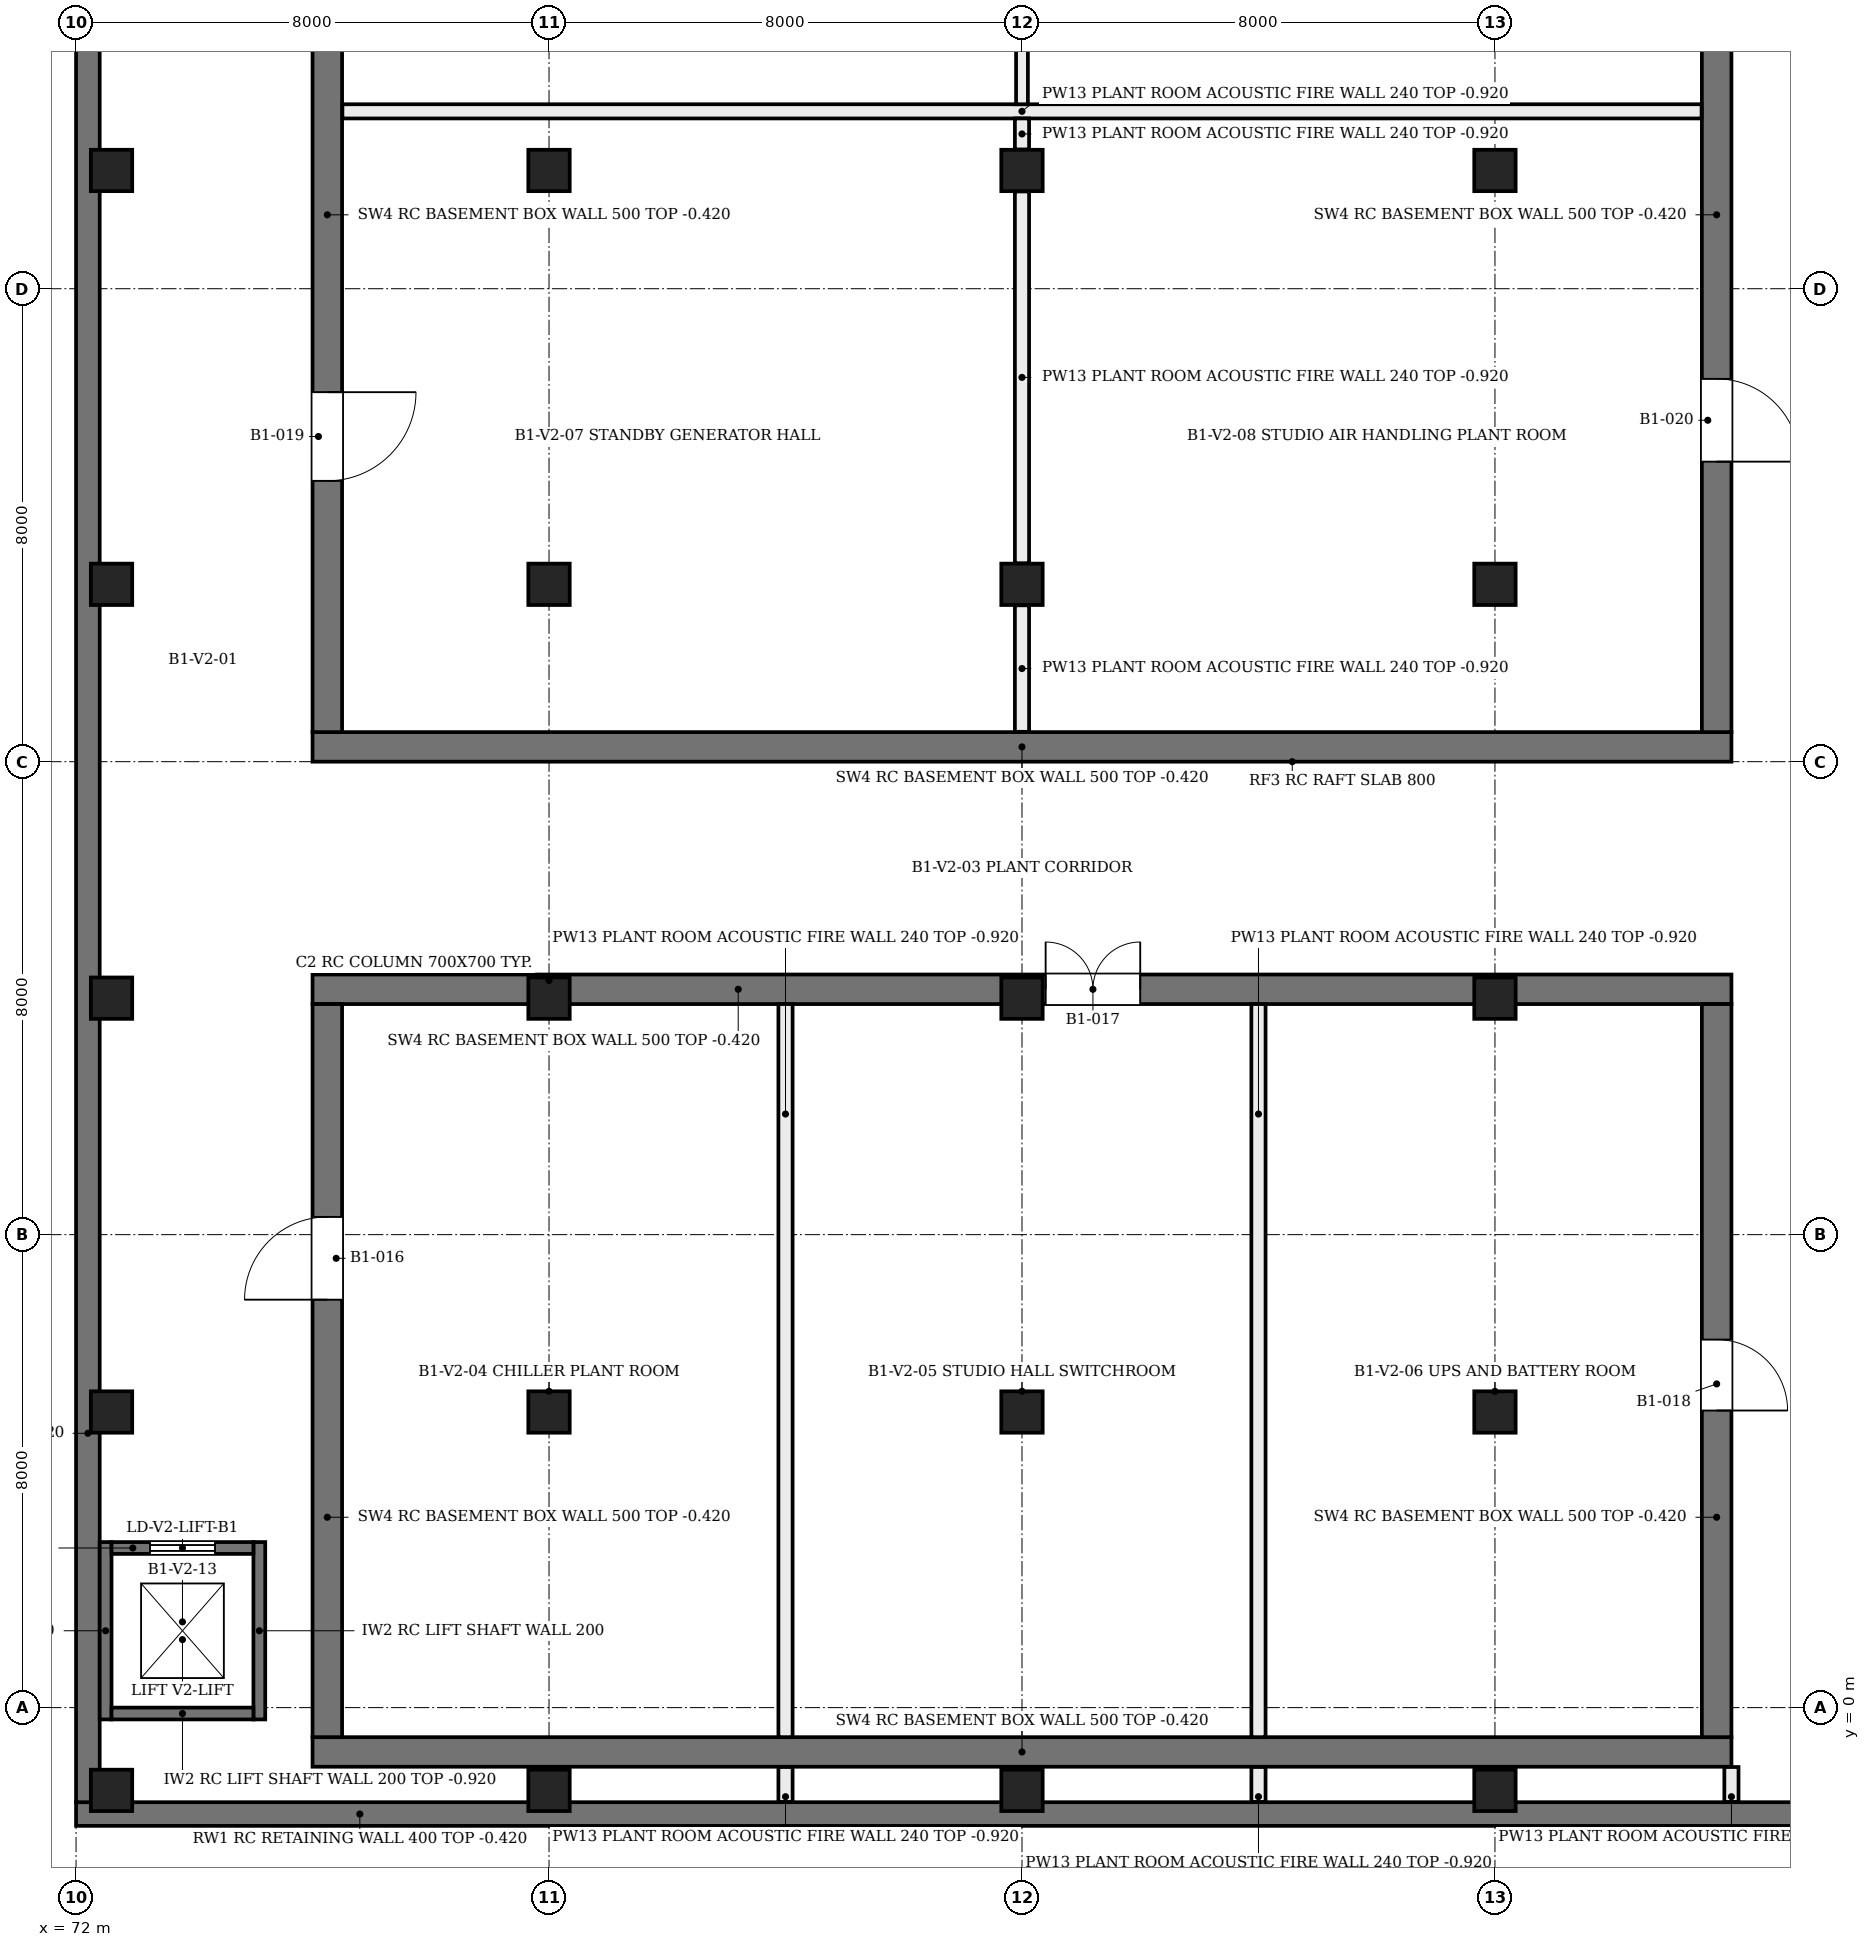
"""IFC4 building model, lengths in metres.
Left out: names, types, materials, properties, quantities, classifications, styles, units other than length and angle.
Written with IfcOpenShell. Run it as: python <this file> out.ifc"""

import sys

from ifc_helpers import new_model, si_unit, direction, frame, frame_2d, origin, origin_2d, place, context, subcontext, project, spatial, rectangle, extrude, element, fill, save


model = new_model("IFC4")
c1 = context("Model", 3, precision=1e-05, world=origin(), true_north=direction((0.0, 1.0)))
c2 = subcontext(c1, "Body", "Model", "MODEL_VIEW")
j1 = project(units=[si_unit("LENGTHUNIT", "METRE"), si_unit("PLANEANGLEUNIT", "RADIAN")], contexts=[c1])
p1 = place(None, origin())
s1 = spatial("IfcSite", under=j1, at=p1, CompositionType="ELEMENT")
p2 = place(p1, origin())
s2 = spatial("IfcBuilding", under=s1, at=p2, CompositionType="ELEMENT")
p3 = place(p2, frame((0.0, 0.0, -4.8)))
s3 = spatial("IfcBuildingStorey", under=s2, at=p3, CompositionType="ELEMENT", Elevation=-4.8)
p4 = place(p3, frame((76.0, 16.25, 0.0), z_axis=(0.0, 0.0, 1.0), x_axis=(1.0, 0.0, 0.0)))
e1 = element("IfcWall", 1, at=p4, inside=s3, PredefinedType="SHEAR", context=c2, shape_type="SweptSolid", body=[
    extrude(rectangle(XDim=24.0, YDim=0.5, at=frame_2d((12.0, 0.0))), origin(), (0.0, 0.0, 1.0), 4.38),
])
p5 = place(p3, frame((76.25, 16.5, 0.0), z_axis=(0.0, 0.0, 1.0), x_axis=(0.0, 1.0, 0.0)))
e2 = element("IfcWall", 2, at=p5, inside=s3, PredefinedType="SHEAR", context=c2, shape_type="SweptSolid", body=[
    extrude(rectangle(XDim=22.4, YDim=0.5, at=frame_2d((11.2, 0.0))), origin(), (0.0, 0.0, 1.0), 4.38),
])
p6 = place(p5, frame((4.25, 0.0, 0.0)))
e3 = element("IfcOpeningElement", 3, at=p6, cuts=e2, PredefinedType="OPENING", context=c2, shape_type="SweptSolid", body=[
    extrude(rectangle(XDim=1.5, YDim=2.7, at=frame_2d((0.75, 1.35))), frame((0.0, 0.26, 0.0), z_axis=(0.0, -1.0, 0.0), x_axis=(1.0, 0.0, 0.0)), (0.0, 0.0, 1.0), 0.52),
])
p7 = place(p5, frame((12.725, 0.0, 0.0)))
e4 = element("IfcOpeningElement", 4, at=p7, cuts=e2, PredefinedType="OPENING", context=c2, shape_type="SweptSolid", body=[
    extrude(rectangle(XDim=1.2, YDim=2.1, at=frame_2d((0.6, 1.05))), frame((0.0, 0.26, 0.0), z_axis=(0.0, -1.0, 0.0), x_axis=(1.0, 0.0, 0.0)), (0.0, 0.0, 1.0), 0.52),
])
p8 = place(p3, frame((99.75, 16.5, 0.0), z_axis=(0.0, 0.0, 1.0), x_axis=(0.0, 1.0, 0.0)))
e5 = element("IfcWall", 5, at=p8, inside=s3, PredefinedType="SHEAR", context=c2, shape_type="SweptSolid", body=[
    extrude(rectangle(XDim=22.4, YDim=0.5, at=frame_2d((11.2, 0.0))), origin(), (0.0, 0.0, 1.0), 4.38),
])
p9 = place(p8, frame((4.575, 0.0, 0.0)))
e6 = element("IfcOpeningElement", 6, at=p9, cuts=e5, PredefinedType="OPENING", context=c2, shape_type="SweptSolid", body=[
    extrude(rectangle(XDim=1.4, YDim=2.4, at=frame_2d((0.7, 1.2))), frame((0.0, 0.26, 0.0), z_axis=(0.0, -1.0, 0.0), x_axis=(1.0, 0.0, 0.0)), (0.0, 0.0, 1.0), 0.52),
])
p10 = place(p8, frame((12.9, 0.0, 0.0)))
e7 = element("IfcOpeningElement", 7, at=p10, cuts=e5, PredefinedType="OPENING", context=c2, shape_type="SweptSolid", body=[
    extrude(rectangle(XDim=1.4, YDim=2.7, at=frame_2d((0.7, 1.35))), frame((0.0, 0.26, 0.0), z_axis=(0.0, -1.0, 0.0), x_axis=(1.0, 0.0, 0.0)), (0.0, 0.0, 1.0), 0.52),
])
p11 = place(p3, frame((76.0, -0.75, 0.0), z_axis=(0.0, 0.0, 1.0), x_axis=(1.0, 0.0, 0.0)))
e8 = element("IfcWall", 8, at=p11, inside=s3, PredefinedType="SHEAR", context=c2, shape_type="SweptSolid", body=[
    extrude(rectangle(XDim=24.0, YDim=0.5, at=frame_2d((12.0, 0.0))), origin(), (0.0, 0.0, 1.0), 4.38),
])
p12 = place(p3, frame((76.0, 12.15, 0.0), z_axis=(0.0, 0.0, 1.0), x_axis=(1.0, 0.0, 0.0)))
e9 = element("IfcWall", 9, at=p12, inside=s3, PredefinedType="SHEAR", context=c2, shape_type="SweptSolid", body=[
    extrude(rectangle(XDim=24.0, YDim=0.5, at=frame_2d((12.0, 0.0))), origin(), (0.0, 0.0, 1.0), 4.38),
])
p13 = place(p12, frame((12.4, 0.0, 0.0)))
e10 = element("IfcOpeningElement", 10, at=p13, cuts=e9, PredefinedType="OPENING", context=c2, shape_type="SweptSolid", body=[
    extrude(rectangle(XDim=1.6, YDim=2.2, at=frame_2d((0.8, 1.1))), frame((0.0, 0.26, 0.0), z_axis=(0.0, -1.0, 0.0), x_axis=(1.0, 0.0, 0.0)), (0.0, 0.0, 1.0), 0.52),
])
p14 = place(p3, frame((76.25, -0.5, 0.0), z_axis=(0.0, 0.0, 1.0), x_axis=(0.0, 1.0, 0.0)))
e11 = element("IfcWall", 11, at=p14, inside=s3, PredefinedType="SHEAR", context=c2, shape_type="SweptSolid", body=[
    extrude(rectangle(XDim=12.4, YDim=0.5, at=frame_2d((6.2, 0.0))), origin(), (0.0, 0.0, 1.0), 4.38),
])
p15 = place(p14, frame((7.4, 0.0, 0.0)))
e12 = element("IfcOpeningElement", 12, at=p15, cuts=e11, PredefinedType="OPENING", context=c2, shape_type="SweptSolid", body=[
    extrude(rectangle(XDim=1.4, YDim=2.4, at=frame_2d((0.7, 1.2))), frame((0.0, 0.26, 0.0), z_axis=(0.0, -1.0, 0.0), x_axis=(1.0, 0.0, 0.0)), (0.0, 0.0, 1.0), 0.52),
])
p16 = place(p3, frame((99.75, -0.5, 0.0), z_axis=(0.0, 0.0, 1.0), x_axis=(0.0, 1.0, 0.0)))
e13 = element("IfcWall", 13, at=p16, inside=s3, PredefinedType="SHEAR", context=c2, shape_type="SweptSolid", body=[
    extrude(rectangle(XDim=12.4, YDim=0.5, at=frame_2d((6.2, 0.0))), origin(), (0.0, 0.0, 1.0), 4.38),
])
p17 = place(p16, frame((5.525, 0.0, 0.0)))
e14 = element("IfcOpeningElement", 14, at=p17, cuts=e13, PredefinedType="OPENING", context=c2, shape_type="SweptSolid", body=[
    extrude(rectangle(XDim=1.2, YDim=2.4, at=frame_2d((0.6, 1.2))), frame((0.0, 0.26, 0.0), z_axis=(0.0, -1.0, 0.0), x_axis=(1.0, 0.0, 0.0)), (0.0, 0.0, 1.0), 0.52),
])
p18 = place(p3, frame((72.0, -1.8, 0.0), z_axis=(0.0, 0.0, 1.0), x_axis=(1.0, 0.0, 0.0)))
e15 = element("IfcWall", 15, at=p18, inside=s3, PredefinedType="SOLIDWALL", context=c2, shape_type="SweptSolid", body=[
    extrude(rectangle(XDim=32.0, YDim=0.4, at=frame_2d((16.0, 0.0))), origin(), (0.0, 0.0, 1.0), 4.38),
])
p19 = place(p3, frame((72.2, -1.6, 0.0), z_axis=(0.0, 0.0, 1.0), x_axis=(0.0, 1.0, 0.0)))
e16 = element("IfcWall", 16, at=p19, inside=s3, PredefinedType="SOLIDWALL", context=c2, shape_type="SweptSolid", body=[
    extrude(rectangle(XDim=41.6, YDim=0.4, at=frame_2d((20.8, 0.0))), origin(), (0.0, 0.0, 1.0), 4.38),
])
for number, where, z_axis, x_axis in (
    (17, (72.6, -1.4, 0.0), (0.0, 0.0, 1.0), (1.0, 0.0, 0.0)),
    (18, (72.6, 5.0, 0.0), (0.0, 0.0, 1.0), (1.0, 0.0, 0.0)),
    (19, (72.6, 12.0, 0.0), (0.0, 0.0, 1.0), (1.0, 0.0, 0.0)),
    (20, (72.6, 19.0, 0.0), (0.0, 0.0, 1.0), (1.0, 0.0, 0.0)),
    (21, (72.6, 26.0, 0.0), (0.0, 0.0, 1.0), (1.0, 0.0, 0.0)),
    (22, (80.0, -1.4, 0.0), (0.0, 0.0, 1.0), (1.0, 0.0, 0.0)),
    (23, (80.0, 5.0, 0.0), (0.0, 0.0, 1.0), (1.0, 0.0, 0.0)),
    (24, (80.0, 12.0, 0.0), (0.0, 0.0, 1.0), (1.0, 0.0, 0.0)),
    (25, (80.0, 19.0, 0.0), (0.0, 0.0, 1.0), (1.0, 0.0, 0.0)),
    (26, (80.0, 26.0, 0.0), (0.0, 0.0, 1.0), (1.0, 0.0, 0.0)),
    (27, (88.0, -1.4, 0.0), (0.0, 0.0, 1.0), (1.0, 0.0, 0.0)),
    (28, (88.0, 5.0, 0.0), (0.0, 0.0, 1.0), (1.0, 0.0, 0.0)),
    (29, (88.0, 12.0, 0.0), (0.0, 0.0, 1.0), (1.0, 0.0, 0.0)),
    (30, (88.0, 19.0, 0.0), (0.0, 0.0, 1.0), (1.0, 0.0, 0.0)),
    (31, (88.0, 26.0, 0.0), (0.0, 0.0, 1.0), (1.0, 0.0, 0.0)),
    (32, (96.0, -1.4, 0.0), (0.0, 0.0, 1.0), (1.0, 0.0, 0.0)),
    (33, (96.0, 5.0, 0.0), (0.0, 0.0, 1.0), (1.0, 0.0, 0.0)),
    (34, (96.0, 12.0, 0.0), (0.0, 0.0, 1.0), (1.0, 0.0, 0.0)),
    (35, (96.0, 19.0, 0.0), (0.0, 0.0, 1.0), (1.0, 0.0, 0.0)),
    (36, (96.0, 26.0, 0.0), (0.0, 0.0, 1.0), (1.0, 0.0, 0.0)),
):
    element("IfcColumn", number, at=place(p3, frame(where, z_axis=z_axis, x_axis=x_axis)), inside=s3, PredefinedType="COLUMN", context=c2, shape_type="SweptSolid", body=[
        extrude(rectangle(XDim=0.7, YDim=0.7, at=origin_2d()), origin(), (0.0, 0.0, 1.0), 4.38),
    ])
p20 = place(p3, frame((72.5, -0.2, 0.0), z_axis=(0.0, 0.0, 1.0), x_axis=(0.0, 1.0, 0.0)))
e37 = element("IfcWall", 37, at=p20, inside=s3, PredefinedType="SOLIDWALL", context=c2, shape_type="SweptSolid", body=[
    extrude(rectangle(XDim=3.0, YDim=0.2, at=frame_2d((1.5, 0.0))), origin(), (0.0, 0.0, 1.0), 3.88),
])
p21 = place(p3, frame((75.1, -0.2, 0.0), z_axis=(0.0, 0.0, 1.0), x_axis=(0.0, 1.0, 0.0)))
e38 = element("IfcWall", 38, at=p21, inside=s3, PredefinedType="SOLIDWALL", context=c2, shape_type="SweptSolid", body=[
    extrude(rectangle(XDim=3.0, YDim=0.2, at=frame_2d((1.5, 0.0))), origin(), (0.0, 0.0, 1.0), 4.55),
])
p22 = place(p3, frame((72.6, -0.1, 0.0), z_axis=(0.0, 0.0, 1.0), x_axis=(1.0, 0.0, 0.0)))
e39 = element("IfcWall", 39, at=p22, inside=s3, PredefinedType="SOLIDWALL", context=c2, shape_type="SweptSolid", body=[
    extrude(rectangle(XDim=2.4, YDim=0.2, at=frame_2d((1.2, 0.0))), origin(), (0.0, 0.0, 1.0), 3.88),
])
p23 = place(p3, frame((72.6, 2.7, 0.0), z_axis=(0.0, 0.0, 1.0), x_axis=(1.0, 0.0, 0.0)))
e40 = element("IfcWall", 40, at=p23, inside=s3, PredefinedType="SOLIDWALL", context=c2, shape_type="SweptSolid", body=[
    extrude(rectangle(XDim=2.4, YDim=0.2, at=frame_2d((1.2, 0.0))), origin(), (0.0, 0.0, 1.0), 3.88),
])
p24 = place(p23, frame((0.65, 0.0, 0.0)))
e41 = element("IfcOpeningElement", 41, at=p24, cuts=e40, PredefinedType="OPENING", context=c2, shape_type="SweptSolid", body=[
    extrude(rectangle(XDim=1.1, YDim=2.1, at=frame_2d((0.55, 1.05))), frame((0.0, 0.11, 0.0), z_axis=(0.0, -1.0, 0.0), x_axis=(1.0, 0.0, 0.0)), (0.0, 0.0, 1.0), 0.22),
])
p25 = place(p3, frame((76.505, 27.0, 0.0), z_axis=(0.0, 0.0, 1.0), x_axis=(1.0, 0.0, 0.0)))
e42 = element("IfcWall", 42, at=p25, inside=s3, PredefinedType="PARTITIONING", context=c2, shape_type="SweptSolid", body=[
    extrude(rectangle(XDim=22.99, YDim=0.24, at=frame_2d((11.495, 0.0))), origin(), (0.0, 0.0, 1.0), 3.88),
])
for number, where, z_axis, x_axis in (
    (43, (100.0, -1.595, 0.0), (0.0, 0.0, 1.0), (0.0, 1.0, 0.0)),
    (44, (84.0, -1.595, 0.0), (0.0, 0.0, 1.0), (0.0, 1.0, 0.0)),
):
    element("IfcWall", number, at=place(p3, frame(where, z_axis=z_axis, x_axis=x_axis)), inside=s3, PredefinedType="PARTITIONING", context=c2, shape_type="SweptSolid", body=[
        extrude(rectangle(XDim=0.59, YDim=0.24, at=frame_2d((0.295, 0.0))), origin(), (0.0, 0.0, 1.0), 3.88),
    ])
p26 = place(p3, frame((84.0, -0.5, 0.0), z_axis=(0.0, 0.0, 1.0), x_axis=(0.0, 1.0, 0.0)))
e45 = element("IfcWall", 45, at=p26, inside=s3, PredefinedType="PARTITIONING", context=c2, shape_type="SweptSolid", body=[
    extrude(rectangle(XDim=12.4, YDim=0.24, at=frame_2d((6.2, 0.0))), origin(), (0.0, 0.0, 1.0), 3.88),
])
p27 = place(p3, frame((92.0, -1.595, 0.0), z_axis=(0.0, 0.0, 1.0), x_axis=(0.0, 1.0, 0.0)))
e46 = element("IfcWall", 46, at=p27, inside=s3, PredefinedType="PARTITIONING", context=c2, shape_type="SweptSolid", body=[
    extrude(rectangle(XDim=0.59, YDim=0.24, at=frame_2d((0.295, 0.0))), origin(), (0.0, 0.0, 1.0), 3.88),
])
p28 = place(p3, frame((92.0, -0.5, 0.0), z_axis=(0.0, 0.0, 1.0), x_axis=(0.0, 1.0, 0.0)))
e47 = element("IfcWall", 47, at=p28, inside=s3, PredefinedType="PARTITIONING", context=c2, shape_type="SweptSolid", body=[
    extrude(rectangle(XDim=12.4, YDim=0.24, at=frame_2d((6.2, 0.0))), origin(), (0.0, 0.0, 1.0), 3.88),
])
p29 = place(p3, frame((88.0, 16.505, 0.0), z_axis=(0.0, 0.0, 1.0), x_axis=(0.0, 1.0, 0.0)))
e48 = element("IfcWall", 48, at=p29, inside=s3, PredefinedType="PARTITIONING", context=c2, shape_type="SweptSolid", body=[
    extrude(rectangle(XDim=2.14, YDim=0.24, at=frame_2d((1.07, 0.0))), origin(), (0.0, 0.0, 1.0), 3.88),
])
p30 = place(p3, frame((88.0, 19.355, 0.0), z_axis=(0.0, 0.0, 1.0), x_axis=(0.0, 1.0, 0.0)))
e49 = element("IfcWall", 49, at=p30, inside=s3, PredefinedType="PARTITIONING", context=c2, shape_type="SweptSolid", body=[
    extrude(rectangle(XDim=6.29, YDim=0.24, at=frame_2d((3.145, 0.0))), origin(), (0.0, 0.0, 1.0), 3.88),
])
p31 = place(p3, frame((88.0, 26.355, 0.0), z_axis=(0.0, 0.0, 1.0), x_axis=(0.0, 1.0, 0.0)))
e50 = element("IfcWall", 50, at=p31, inside=s3, PredefinedType="PARTITIONING", context=c2, shape_type="SweptSolid", body=[
    extrude(rectangle(XDim=0.525, YDim=0.24, at=frame_2d((0.262, 0.0))), origin(), (0.0, 0.0, 1.0), 3.88),
])
p32 = place(p3, frame((88.0, 27.12, 0.0), z_axis=(0.0, 0.0, 1.0), x_axis=(0.0, 1.0, 0.0)))
e51 = element("IfcWall", 51, at=p32, inside=s3, PredefinedType="PARTITIONING", context=c2, shape_type="SweptSolid", body=[
    extrude(rectangle(XDim=5.525, YDim=0.2, at=frame_2d((2.762, 0.0))), origin(), (0.0, 0.0, 1.0), 3.88),
])
p33 = place(p24, origin())
e52 = element("IfcDoor", 52, at=p33, inside=s3, OperationType="DOUBLE_DOOR_SLIDING", PredefinedType="DOOR", context=c2, shape_type="SweptSolid", body=[
    extrude(rectangle(XDim=1.1, YDim=2.1, at=frame_2d((0.55, 1.05))), frame((0.0, 0.025, 0.0), z_axis=(0.0, -1.0, 0.0), x_axis=(1.0, 0.0, 0.0)), (0.0, 0.0, 1.0), 0.05),
])
fill(e41, e52)
p34 = place(p15, origin())
e53 = element("IfcDoor", 53, at=p34, inside=s3, OperationType="SINGLE_SWING_LEFT", PredefinedType="DOOR", context=c2, shape_type="SweptSolid", body=[
    extrude(rectangle(XDim=1.4, YDim=2.4, at=frame_2d((0.7, 1.2))), frame((0.0, 0.025, 0.0), z_axis=(0.0, -1.0, 0.0), x_axis=(1.0, 0.0, 0.0)), (0.0, 0.0, 1.0), 0.05),
])
fill(e12, e53)
p35 = place(p13, origin())
e54 = element("IfcDoor", 54, at=p35, inside=s3, OperationType="DOUBLE_DOOR_SINGLE_SWING", PredefinedType="DOOR", context=c2, shape_type="SweptSolid", body=[
    extrude(rectangle(XDim=1.6, YDim=2.2, at=frame_2d((0.8, 1.1))), frame((0.0, 0.025, 0.0), z_axis=(0.0, -1.0, 0.0), x_axis=(1.0, 0.0, 0.0)), (0.0, 0.0, 1.0), 0.05),
])
fill(e10, e54)
p36 = place(p17, frame((1.2, 0.0, 0.0), z_axis=(0.0, 0.0, 1.0), x_axis=(-1.0, 0.0, 0.0)))
e55 = element("IfcDoor", 55, at=p36, inside=s3, OperationType="SINGLE_SWING_LEFT", PredefinedType="DOOR", context=c2, shape_type="SweptSolid", body=[
    extrude(rectangle(XDim=1.2, YDim=2.4, at=frame_2d((0.6, 1.2))), frame((0.0, 0.025, 0.0), z_axis=(0.0, -1.0, 0.0), x_axis=(1.0, 0.0, 0.0)), (0.0, 0.0, 1.0), 0.05),
])
fill(e14, e55)
p37 = place(p6, origin())
e56 = element("IfcDoor", 56, at=p37, inside=s3, OperationType="SINGLE_SWING_RIGHT", PredefinedType="DOOR", context=c2, shape_type="SweptSolid", body=[
    extrude(rectangle(XDim=1.5, YDim=2.7, at=frame_2d((0.75, 1.35))), frame((0.0, 0.025, 0.0), z_axis=(0.0, -1.0, 0.0), x_axis=(1.0, 0.0, 0.0)), (0.0, 0.0, 1.0), 0.05),
])
fill(e3, e56)
p38 = place(p9, frame((1.4, 0.0, 0.0), z_axis=(0.0, 0.0, 1.0), x_axis=(-1.0, 0.0, 0.0)))
e57 = element("IfcDoor", 57, at=p38, inside=s3, OperationType="SINGLE_SWING_LEFT", PredefinedType="DOOR", context=c2, shape_type="SweptSolid", body=[
    extrude(rectangle(XDim=1.4, YDim=2.4, at=frame_2d((0.7, 1.2))), frame((0.0, 0.025, 0.0), z_axis=(0.0, -1.0, 0.0), x_axis=(1.0, 0.0, 0.0)), (0.0, 0.0, 1.0), 0.05),
])
fill(e6, e57)
save(model, sys.argv[1])
